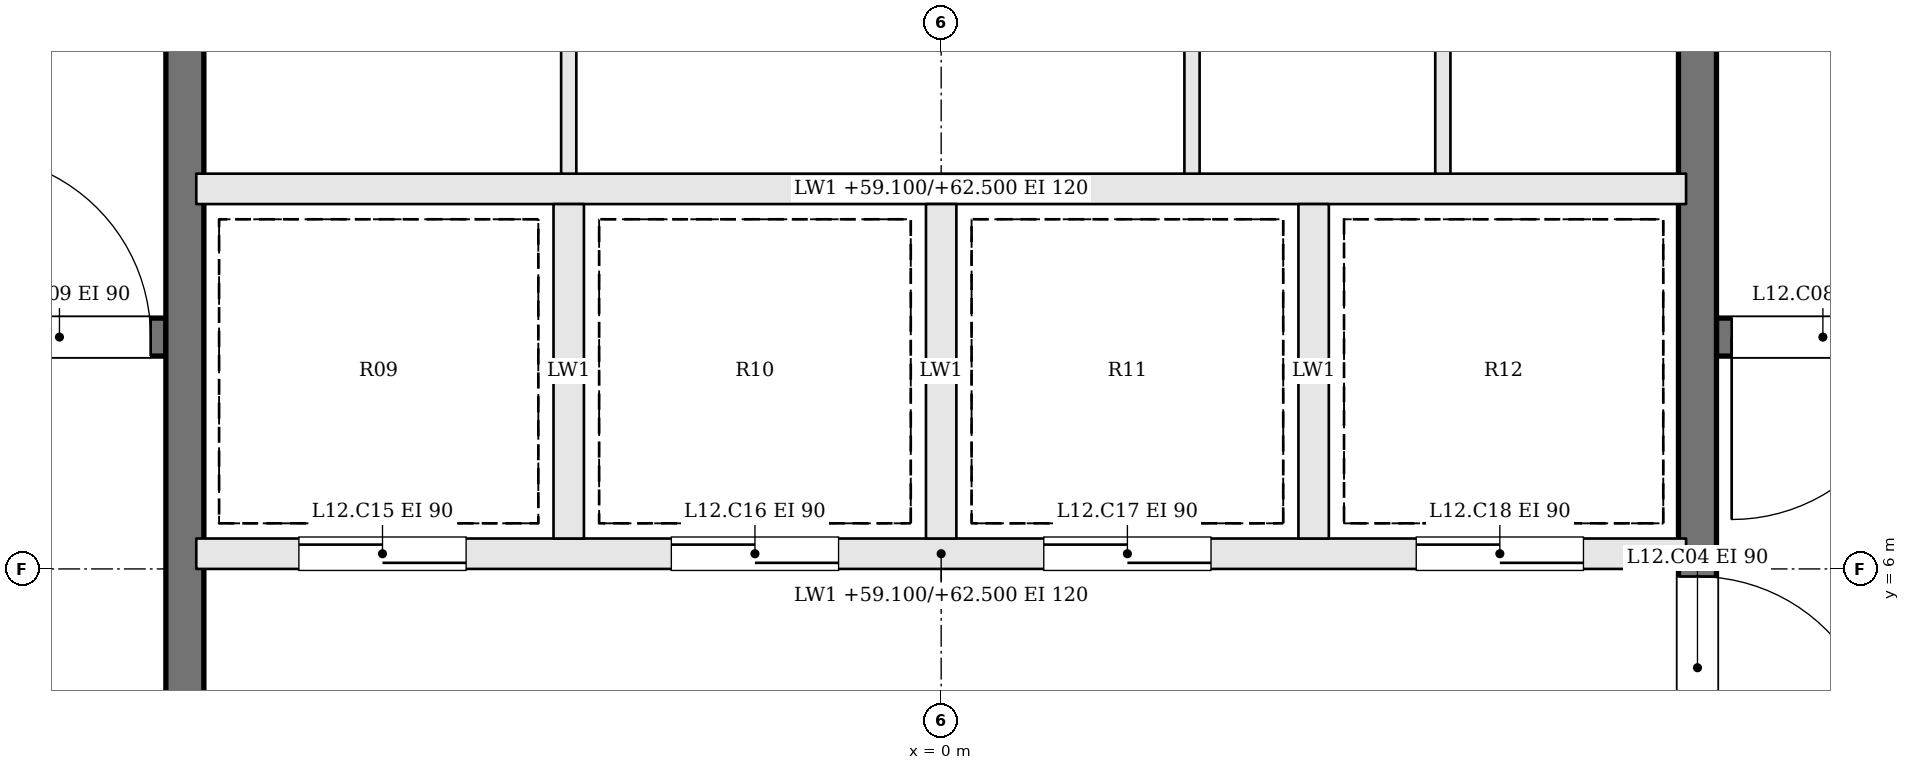
"""IFC4 building model, lengths in metres.
Left out: names, types, materials, properties, quantities, classifications, styles, units other than length and angle.
Written with IfcOpenShell. Run it as: python <this file> out.ifc"""

import sys

from ifc_helpers import new_model, si_unit, direction, frame, frame_2d, origin, place, context, subcontext, project, spatial, rectangle, extrude, element, fill, save


model = new_model("IFC4")
c1 = context("Model", 3, precision=1e-05, world=origin(), true_north=direction((0.0, 1.0)))
c2 = subcontext(c1, "Body", "Model", "MODEL_VIEW")
j1 = project(units=[si_unit("LENGTHUNIT", "METRE"), si_unit("PLANEANGLEUNIT", "RADIAN")], contexts=[c1])
p1 = place(None, origin())
s1 = spatial("IfcSite", under=j1, at=p1, CompositionType="ELEMENT")
p2 = place(p1, origin())
s2 = spatial("IfcBuilding", under=s1, at=p2, CompositionType="ELEMENT")
p3 = place(p2, frame((0.0, 0.0, 59.1)))
s3 = spatial("IfcBuildingStorey", under=s2, at=p3, CompositionType="ELEMENT", Elevation=59.1)
p4 = place(p3, frame((11.6, 7.525, 0.0), z_axis=(0.0, 0.0, 1.0), x_axis=(-1.0, 0.0, 0.0)))
e1 = element("IfcWall", 1, at=p4, inside=s3, PredefinedType="SOLIDWALL", context=c2, shape_type="SweptSolid", body=[
    extrude(rectangle(XDim=6.5, YDim=0.25, at=frame_2d((3.25, 0.0))), origin(), (0.0, 0.0, 1.0), 3.4),
])
p5 = place(p4, frame((5.2, 0.0, 0.0)))
e2 = element("IfcOpeningElement", 2, at=p5, cuts=e1, PredefinedType="OPENING", context=c2, shape_type="SweptSolid", body=[
    extrude(rectangle(XDim=1.2, YDim=2.1, at=frame_2d((0.6, 1.05))), frame((0.0, 0.135, 0.0), z_axis=(0.0, -1.0, 0.0), x_axis=(1.0, 0.0, 0.0)), (0.0, 0.0, 1.0), 0.27),
])
p6 = place(p3, frame((-11.6, 7.525, 0.0), z_axis=(0.0, 0.0, 1.0), x_axis=(1.0, 0.0, 0.0)))
e3 = element("IfcWall", 3, at=p6, inside=s3, PredefinedType="SOLIDWALL", context=c2, shape_type="SweptSolid", body=[
    extrude(rectangle(XDim=6.5, YDim=0.25, at=frame_2d((3.25, 0.0))), origin(), (0.0, 0.0, 1.0), 3.4),
])
p7 = place(p6, frame((5.2, 0.0, 0.0)))
e4 = element("IfcOpeningElement", 4, at=p7, cuts=e3, PredefinedType="OPENING", context=c2, shape_type="SweptSolid", body=[
    extrude(rectangle(XDim=1.2, YDim=2.1, at=frame_2d((0.6, 1.05))), frame((0.0, 0.135, 0.0), z_axis=(0.0, -1.0, 0.0), x_axis=(1.0, 0.0, 0.0)), (0.0, 0.0, 1.0), 0.27),
])
p8 = place(p3, frame((-4.975, -1.6, 0.0), z_axis=(0.0, 0.0, 1.0), x_axis=(0.0, 1.0, 0.0)))
e5 = element("IfcWall", 5, at=p8, inside=s3, PredefinedType="SOLIDWALL", context=c2, shape_type="SweptSolid", body=[
    extrude(rectangle(XDim=12.2, YDim=0.25, at=frame_2d((6.1, 0.0))), origin(), (0.0, 0.0, 1.0), 3.4),
])
p9 = place(p8, frame((4.65, 0.0, 0.0)))
e6 = element("IfcOpeningElement", 6, at=p9, cuts=e5, PredefinedType="OPENING", context=c2, shape_type="SweptSolid", body=[
    extrude(rectangle(XDim=1.2, YDim=2.1, at=frame_2d((0.6, 1.05))), frame((0.0, 0.135, 0.0), z_axis=(0.0, -1.0, 0.0), x_axis=(1.0, 0.0, 0.0)), (0.0, 0.0, 1.0), 0.27),
])
p10 = place(p3, frame((4.975, 10.6, 0.0), z_axis=(0.0, 0.0, 1.0), x_axis=(0.0, -1.0, 0.0)))
e7 = element("IfcWall", 7, at=p10, inside=s3, PredefinedType="SOLIDWALL", context=c2, shape_type="SweptSolid", body=[
    extrude(rectangle(XDim=12.2, YDim=0.25, at=frame_2d((6.1, 0.0))), origin(), (0.0, 0.0, 1.0), 3.4),
])
p11 = place(p10, frame((4.65, 0.0, 0.0)))
e8 = element("IfcOpeningElement", 8, at=p11, cuts=e7, PredefinedType="OPENING", context=c2, shape_type="SweptSolid", body=[
    extrude(rectangle(XDim=1.2, YDim=2.1, at=frame_2d((0.6, 1.05))), frame((0.0, 0.135, 0.0), z_axis=(0.0, -1.0, 0.0), x_axis=(1.0, 0.0, 0.0)), (0.0, 0.0, 1.0), 0.27),
])
p12 = place(p3, frame((-4.9, 6.1, 0.0), z_axis=(0.0, 0.0, 1.0), x_axis=(1.0, 0.0, 0.0)))
e9 = element("IfcWall", 9, at=p12, inside=s3, PredefinedType="SOLIDWALL", context=c2, shape_type="SweptSolid", body=[
    extrude(rectangle(XDim=9.8, YDim=0.2, at=frame_2d((4.9, 0.0))), origin(), (0.0, 0.0, 1.0), 3.4),
])
p13 = place(p12, frame((0.675, 0.0, 0.0)))
e10 = element("IfcOpeningElement", 10, at=p13, cuts=e9, PredefinedType="OPENING", context=c2, shape_type="SweptSolid", body=[
    extrude(rectangle(XDim=1.1, YDim=2.1, at=frame_2d((0.55, 1.05))), frame((0.0, 0.11, 0.0), z_axis=(0.0, -1.0, 0.0), x_axis=(1.0, 0.0, 0.0)), (0.0, 0.0, 1.0), 0.22),
])
p14 = place(p12, frame((3.125, 0.0, 0.0)))
e11 = element("IfcOpeningElement", 11, at=p14, cuts=e9, PredefinedType="OPENING", context=c2, shape_type="SweptSolid", body=[
    extrude(rectangle(XDim=1.1, YDim=2.1, at=frame_2d((0.55, 1.05))), frame((0.0, 0.11, 0.0), z_axis=(0.0, -1.0, 0.0), x_axis=(1.0, 0.0, 0.0)), (0.0, 0.0, 1.0), 0.22),
])
p15 = place(p12, frame((5.575, 0.0, 0.0)))
e12 = element("IfcOpeningElement", 12, at=p15, cuts=e9, PredefinedType="OPENING", context=c2, shape_type="SweptSolid", body=[
    extrude(rectangle(XDim=1.1, YDim=2.1, at=frame_2d((0.55, 1.05))), frame((0.0, 0.11, 0.0), z_axis=(0.0, -1.0, 0.0), x_axis=(1.0, 0.0, 0.0)), (0.0, 0.0, 1.0), 0.22),
])
p16 = place(p12, frame((8.025, 0.0, 0.0)))
e13 = element("IfcOpeningElement", 13, at=p16, cuts=e9, PredefinedType="OPENING", context=c2, shape_type="SweptSolid", body=[
    extrude(rectangle(XDim=1.1, YDim=2.1, at=frame_2d((0.55, 1.05))), frame((0.0, 0.11, 0.0), z_axis=(0.0, -1.0, 0.0), x_axis=(1.0, 0.0, 0.0)), (0.0, 0.0, 1.0), 0.22),
])
p17 = place(p3, frame((-4.9, 8.5, 0.0), z_axis=(0.0, 0.0, 1.0), x_axis=(1.0, 0.0, 0.0)))
e14 = element("IfcWall", 14, at=p17, inside=s3, PredefinedType="SOLIDWALL", context=c2, shape_type="SweptSolid", body=[
    extrude(rectangle(XDim=9.8, YDim=0.2, at=frame_2d((4.9, 0.0))), origin(), (0.0, 0.0, 1.0), 3.4),
])
for number, where, z_axis, x_axis in (
    (15, (-2.45, 6.2, 0.0), (0.0, 0.0, 1.0), (0.0, 1.0, 0.0)),
    (16, (0.0, 6.2, 0.0), (0.0, 0.0, 1.0), (0.0, 1.0, 0.0)),
    (17, (2.45, 6.2, 0.0), (0.0, 0.0, 1.0), (0.0, 1.0, 0.0)),
):
    element("IfcWall", number, at=place(p3, frame(where, z_axis=z_axis, x_axis=x_axis)), inside=s3, PredefinedType="SOLIDWALL", context=c2, shape_type="SweptSolid", body=[
        extrude(rectangle(XDim=2.2, YDim=0.2, at=frame_2d((1.1, 0.0))), origin(), (0.0, 0.0, 1.0), 3.4),
    ])
for number, where, z_axis, x_axis in (
    (18, (-2.45, 8.6, 0.0), (0.0, 0.0, 1.0), (0.0, 1.0, 0.0)),
    (19, (1.65, 8.6, 0.0), (0.0, 0.0, 1.0), (0.0, 1.0, 0.0)),
    (20, (3.3, 8.6, 0.0), (0.0, 0.0, 1.0), (0.0, 1.0, 0.0)),
):
    element("IfcWall", number, at=place(p3, frame(where, z_axis=z_axis, x_axis=x_axis)), inside=s3, PredefinedType="PARTITIONING", context=c2, shape_type="SweptSolid", body=[
        extrude(rectangle(XDim=2.0, YDim=0.1, at=frame_2d((1.0, 0.0))), origin(), (0.0, 0.0, 1.0), 3.4),
    ])
p18 = place(p11, origin())
e21 = element("IfcDoor", 21, at=p18, inside=s3, OperationType="SINGLE_SWING_RIGHT", PredefinedType="DOOR", context=c2, shape_type="SweptSolid", body=[
    extrude(rectangle(XDim=1.2, YDim=2.1, at=frame_2d((0.6, 1.05))), frame((0.0, 0.025, 0.0), z_axis=(0.0, -1.0, 0.0), x_axis=(1.0, 0.0, 0.0)), (0.0, 0.0, 1.0), 0.05),
])
fill(e8, e21)
p19 = place(p5, origin())
e22 = element("IfcDoor", 22, at=p19, inside=s3, OperationType="SINGLE_SWING_RIGHT", PredefinedType="DOOR", context=c2, shape_type="SweptSolid", body=[
    extrude(rectangle(XDim=1.2, YDim=2.1, at=frame_2d((0.6, 1.05))), frame((0.0, 0.025, 0.0), z_axis=(0.0, -1.0, 0.0), x_axis=(1.0, 0.0, 0.0)), (0.0, 0.0, 1.0), 0.05),
])
fill(e2, e22)
p20 = place(p7, origin())
e23 = element("IfcDoor", 23, at=p20, inside=s3, OperationType="SINGLE_SWING_LEFT", PredefinedType="DOOR", context=c2, shape_type="SweptSolid", body=[
    extrude(rectangle(XDim=1.2, YDim=2.1, at=frame_2d((0.6, 1.05))), frame((0.0, 0.025, 0.0), z_axis=(0.0, -1.0, 0.0), x_axis=(1.0, 0.0, 0.0)), (0.0, 0.0, 1.0), 0.05),
])
fill(e4, e23)
p21 = place(p13, origin())
e24 = element("IfcDoor", 24, at=p21, inside=s3, OperationType="SLIDING_TO_RIGHT", PredefinedType="DOOR", context=c2, shape_type="SweptSolid", body=[
    extrude(rectangle(XDim=1.1, YDim=2.1, at=frame_2d((0.55, 1.05))), frame((0.0, 0.025, 0.0), z_axis=(0.0, -1.0, 0.0), x_axis=(1.0, 0.0, 0.0)), (0.0, 0.0, 1.0), 0.05),
])
fill(e10, e24)
p22 = place(p14, origin())
e25 = element("IfcDoor", 25, at=p22, inside=s3, OperationType="SLIDING_TO_LEFT", PredefinedType="DOOR", context=c2, shape_type="SweptSolid", body=[
    extrude(rectangle(XDim=1.1, YDim=2.1, at=frame_2d((0.55, 1.05))), frame((0.0, 0.025, 0.0), z_axis=(0.0, -1.0, 0.0), x_axis=(1.0, 0.0, 0.0)), (0.0, 0.0, 1.0), 0.05),
])
fill(e11, e25)
p23 = place(p15, origin())
e26 = element("IfcDoor", 26, at=p23, inside=s3, OperationType="SLIDING_TO_RIGHT", PredefinedType="DOOR", context=c2, shape_type="SweptSolid", body=[
    extrude(rectangle(XDim=1.1, YDim=2.1, at=frame_2d((0.55, 1.05))), frame((0.0, 0.025, 0.0), z_axis=(0.0, -1.0, 0.0), x_axis=(1.0, 0.0, 0.0)), (0.0, 0.0, 1.0), 0.05),
])
fill(e12, e26)
p24 = place(p16, origin())
e27 = element("IfcDoor", 27, at=p24, inside=s3, OperationType="SLIDING_TO_LEFT", PredefinedType="DOOR", context=c2, shape_type="SweptSolid", body=[
    extrude(rectangle(XDim=1.1, YDim=2.1, at=frame_2d((0.55, 1.05))), frame((0.0, 0.025, 0.0), z_axis=(0.0, -1.0, 0.0), x_axis=(1.0, 0.0, 0.0)), (0.0, 0.0, 1.0), 0.05),
])
fill(e13, e27)
save(model, sys.argv[1])
